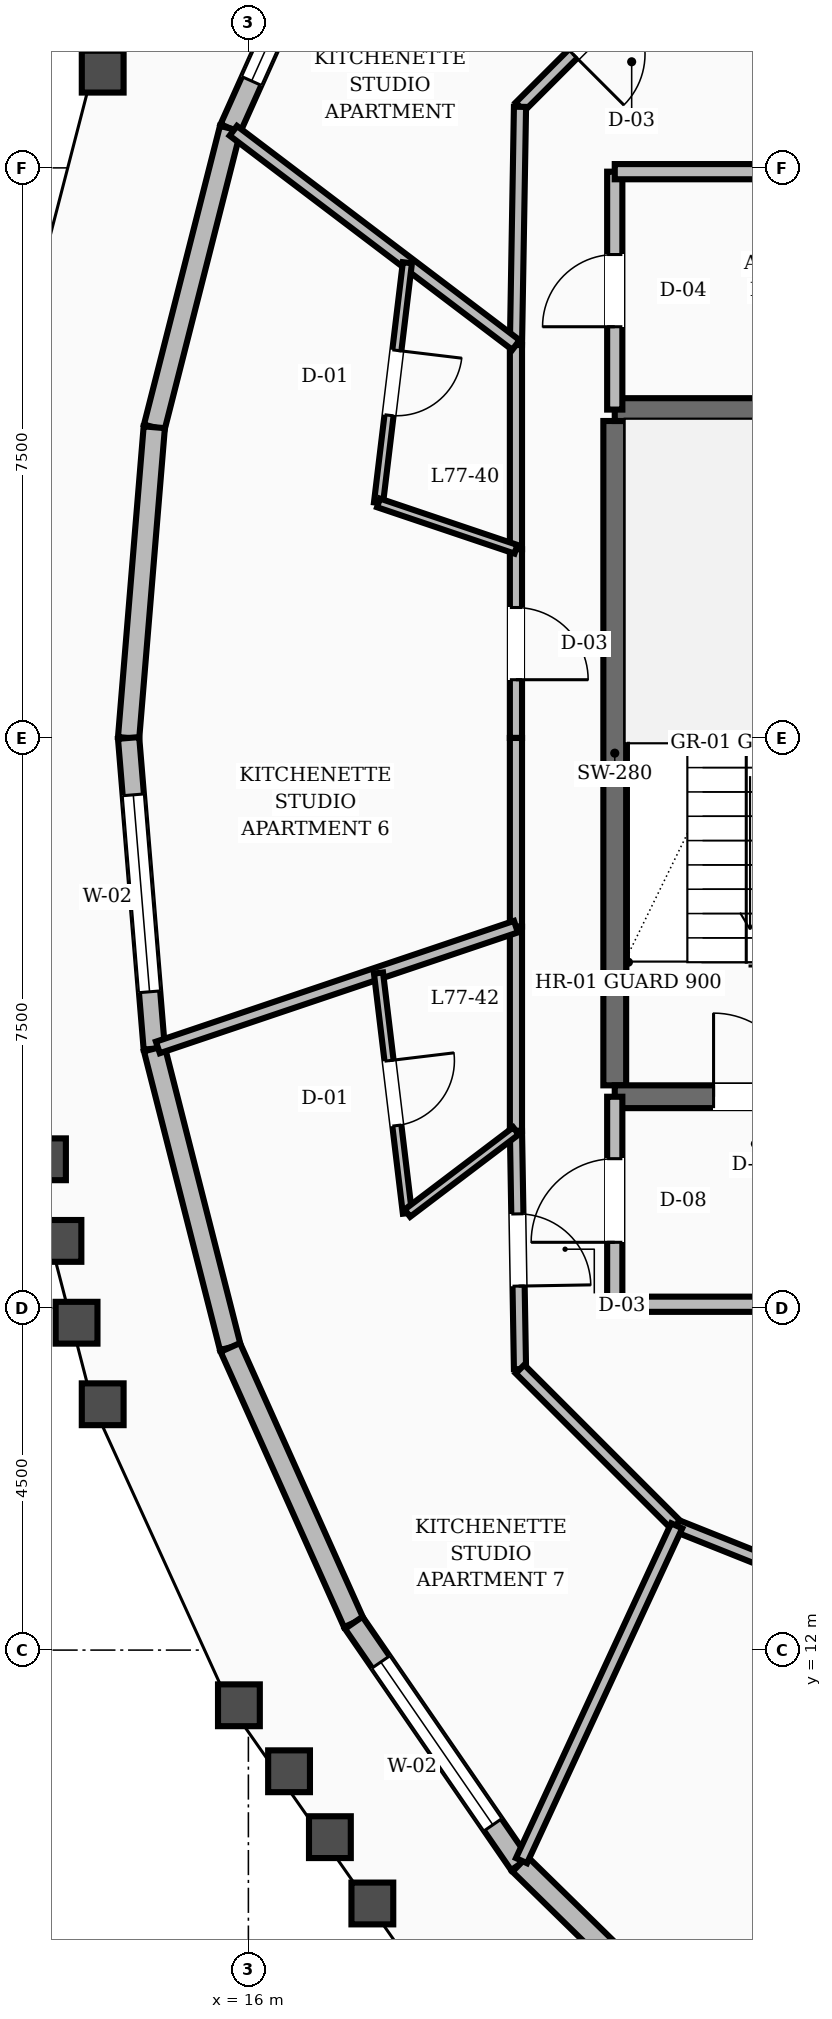
"""IFC4 building model, lengths in metres.
Left out: names, types, materials, properties, quantities, classifications, styles, units other than length and angle.
Written with IfcOpenShell. Run it as: python <this file> out.ifc"""

import sys

from ifc_helpers import new_model, si_unit, direction, frame, frame_2d, origin, place, context, subcontext, project, spatial, rectangle, extrude, element, fill, save


model = new_model("IFC4")
c1 = context("Model", 3, precision=1e-05, world=origin(), true_north=direction((0.0, 1.0)))
c2 = subcontext(c1, "Body", "Model", "MODEL_VIEW")
j1 = project(units=[si_unit("LENGTHUNIT", "METRE"), si_unit("PLANEANGLEUNIT", "RADIAN")], contexts=[c1])
p1 = place(None, origin())
s1 = spatial("IfcSite", under=j1, at=p1, CompositionType="ELEMENT")
p2 = place(p1, origin())
s2 = spatial("IfcBuilding", under=s1, at=p2, CompositionType="ELEMENT")
p3 = place(p2, frame((0.0, 0.0, 294.0)))
s3 = spatial("IfcBuildingStorey", under=s2, at=p3, CompositionType="ELEMENT", Elevation=294.0)
p4 = place(p3, frame((20.82, 19.43, 0.0), z_axis=(0.0, 0.0, 1.0), x_axis=(0.0, 1.0, 0.0)))
e1 = element("IfcWall", 1, at=p4, inside=s3, PredefinedType="SHEAR", context=c2, shape_type="SweptSolid", body=[
    extrude(rectangle(XDim=8.74, YDim=0.3, at=frame_2d((4.37, 0.0))), origin(), (0.0, 0.0, 1.0), 3.6),
])
p5 = place(p3, frame((20.82, 19.28, 0.0), z_axis=(0.0, 0.0, 1.0), x_axis=(1.0, 0.0, 0.0)))
e2 = element("IfcWall", 2, at=p5, inside=s3, PredefinedType="SHEAR", context=c2, shape_type="SweptSolid", body=[
    extrude(rectangle(XDim=3.6, YDim=0.3, at=frame_2d((1.8, 0.0))), origin(), (0.0, 0.0, 1.0), 3.6),
])
p6 = place(p5, frame((1.3, 0.0, 0.0)))
e3 = element("IfcOpeningElement", 3, at=p6, cuts=e2, PredefinedType="OPENING", context=c2, shape_type="SweptSolid", body=[
    extrude(rectangle(XDim=1.1, YDim=2.1, at=frame_2d((0.55, 1.05))), frame((0.0, 0.16, 0.0), z_axis=(0.0, -1.0, 0.0), x_axis=(1.0, 0.0, 0.0)), (0.0, 0.0, 1.0), 0.32),
])
p7 = place(p3, frame((20.82, 28.32, 0.0), z_axis=(0.0, 0.0, 1.0), x_axis=(1.0, 0.0, 0.0)))
e4 = element("IfcWall", 4, at=p7, inside=s3, PredefinedType="SHEAR", context=c2, shape_type="SweptSolid", body=[
    extrude(rectangle(XDim=3.6, YDim=0.3, at=frame_2d((1.8, 0.0))), origin(), (0.0, 0.0, 1.0), 3.6),
])
p8 = place(p3, frame((17.386, 35.64, 0.0), z_axis=(0.0, 0.0, 1.0), x_axis=(-0.409103581908, -0.912487950205, 0.0)))
e5 = element("IfcWall", 5, at=p8, inside=s3, PredefinedType="STANDARD", context=c2, shape_type="SweptSolid", body=[
    extrude(rectangle(XDim=3.97, YDim=0.28, at=frame_2d((1.985, 0.0))), origin(), (0.0, 0.0, 1.0), 2.82),
])
p9 = place(p8, frame((0.685, 0.0, 0.8)))
e6 = element("IfcOpeningElement", 6, at=p9, cuts=e5, PredefinedType="OPENING", context=c2, shape_type="SweptSolid", body=[
    extrude(rectangle(XDim=2.6, YDim=1.65, at=frame_2d((1.3, 0.825))), frame((0.0, 0.15, 0.0), z_axis=(0.0, -1.0, 0.0), x_axis=(1.0, 0.0, 0.0)), (0.0, 0.0, 1.0), 0.3),
])
p10 = place(p3, frame((15.762, 32.018, 0.0), z_axis=(0.0, 0.0, 1.0), x_axis=(-0.246626857917, -0.969110516378, 0.0)))
e7 = element("IfcWall", 7, at=p10, inside=s3, PredefinedType="STANDARD", context=c2, shape_type="SweptSolid", body=[
    extrude(rectangle(XDim=4.056, YDim=0.28, at=frame_2d((2.028, 0.0))), origin(), (0.0, 0.0, 1.0), 2.82),
])
p11 = place(p3, frame((14.762, 28.088, 0.0), z_axis=(0.0, 0.0, 1.0), x_axis=(-0.082321320945, -0.996605839898, 0.0)))
e8 = element("IfcWall", 8, at=p11, inside=s3, PredefinedType="STANDARD", context=c2, shape_type="SweptSolid", body=[
    extrude(rectangle(XDim=4.102, YDim=0.28, at=frame_2d((2.051, 0.0))), origin(), (0.0, 0.0, 1.0), 2.82),
])
p12 = place(p3, frame((14.424, 24.0, 0.0), z_axis=(0.0, 0.0, 1.0), x_axis=(0.082321320945, -0.996605839898, 0.0)))
e9 = element("IfcWall", 9, at=p12, inside=s3, PredefinedType="STANDARD", context=c2, shape_type="SweptSolid", body=[
    extrude(rectangle(XDim=4.102, YDim=0.28, at=frame_2d((2.051, 0.0))), origin(), (0.0, 0.0, 1.0), 2.82),
])
p13 = place(p12, frame((0.751, 0.0, 0.8)))
e10 = element("IfcOpeningElement", 10, at=p13, cuts=e9, PredefinedType="OPENING", context=c2, shape_type="SweptSolid", body=[
    extrude(rectangle(XDim=2.6, YDim=1.65, at=frame_2d((1.3, 0.825))), frame((0.0, 0.15, 0.0), z_axis=(0.0, -1.0, 0.0), x_axis=(1.0, 0.0, 0.0)), (0.0, 0.0, 1.0), 0.3),
])
p14 = place(p3, frame((14.762, 19.912, 0.0), z_axis=(0.0, 0.0, 1.0), x_axis=(0.246626857917, -0.969110516378, 0.0)))
e11 = element("IfcWall", 11, at=p14, inside=s3, PredefinedType="STANDARD", context=c2, shape_type="SweptSolid", body=[
    extrude(rectangle(XDim=4.056, YDim=0.28, at=frame_2d((2.028, 0.0))), origin(), (0.0, 0.0, 1.0), 2.82),
])
p15 = place(p3, frame((15.762, 15.982, 0.0), z_axis=(0.0, 0.0, 1.0), x_axis=(0.409103581908, -0.912487950205, 0.0)))
e12 = element("IfcWall", 12, at=p15, inside=s3, PredefinedType="STANDARD", context=c2, shape_type="SweptSolid", body=[
    extrude(rectangle(XDim=3.97, YDim=0.28, at=frame_2d((1.985, 0.0))), origin(), (0.0, 0.0, 1.0), 2.82),
])
p16 = place(p3, frame((17.386, 12.36, 0.0), z_axis=(0.0, 0.0, 1.0), x_axis=(0.567090463347, -0.823655514388, 0.0)))
e13 = element("IfcWall", 13, at=p16, inside=s3, PredefinedType="STANDARD", context=c2, shape_type="SweptSolid", body=[
    extrude(rectangle(XDim=3.855, YDim=0.28, at=frame_2d((1.927, 0.0))), origin(), (0.0, 0.0, 1.0), 2.82),
])
p17 = place(p16, frame((0.627, 0.0, 0.8)))
e14 = element("IfcOpeningElement", 14, at=p17, cuts=e13, PredefinedType="OPENING", context=c2, shape_type="SweptSolid", body=[
    extrude(rectangle(XDim=2.6, YDim=1.65, at=frame_2d((1.3, 0.825))), frame((0.0, 0.15, 0.0), z_axis=(0.0, -1.0, 0.0), x_axis=(1.0, 0.0, 0.0)), (0.0, 0.0, 1.0), 0.3),
])
p18 = place(p3, frame((19.572, 9.185, 0.0), z_axis=(0.0, 0.0, 1.0), x_axis=(0.714829041056, -0.699299250724, 0.0)))
e15 = element("IfcWall", 15, at=p18, inside=s3, PredefinedType="STANDARD", context=c2, shape_type="SweptSolid", body=[
    extrude(rectangle(XDim=3.726, YDim=0.28, at=frame_2d((1.863, 0.0))), origin(), (0.0, 0.0, 1.0), 2.82),
])
p19 = place(p3, frame((20.82, 16.55, 0.0), z_axis=(0.0, 0.0, 1.0), x_axis=(0.0, 1.0, 0.0)))
e16 = element("IfcWall", 16, at=p19, inside=s3, PredefinedType="SOLIDWALL", context=c2, shape_type="SweptSolid", body=[
    extrude(rectangle(XDim=2.73, YDim=0.2, at=frame_2d((1.365, 0.0))), origin(), (0.0, 0.0, 1.0), 2.81),
])
p20 = place(p19, frame((0.815, 0.0, 0.0)))
e17 = element("IfcOpeningElement", 17, at=p20, cuts=e16, PredefinedType="OPENING", context=c2, shape_type="SweptSolid", body=[
    extrude(rectangle(XDim=1.1, YDim=2.1, at=frame_2d((0.55, 1.05))), frame((0.0, 0.11, 0.0), z_axis=(0.0, -1.0, 0.0), x_axis=(1.0, 0.0, 0.0)), (0.0, 0.0, 1.0), 0.22),
])
p21 = place(p3, frame((20.82, 16.55, 0.0), z_axis=(0.0, 0.0, 1.0), x_axis=(1.0, 0.0, 0.0)))
e18 = element("IfcWall", 18, at=p21, inside=s3, PredefinedType="SOLIDWALL", context=c2, shape_type="SweptSolid", body=[
    extrude(rectangle(XDim=3.98, YDim=0.2, at=frame_2d((1.99, 0.0))), origin(), (0.0, 0.0, 1.0), 2.81),
])
p22 = place(p3, frame((20.82, 28.32, 0.0), z_axis=(0.0, 0.0, 1.0), x_axis=(0.0, 1.0, 0.0)))
e19 = element("IfcWall", 19, at=p22, inside=s3, PredefinedType="SOLIDWALL", context=c2, shape_type="SweptSolid", body=[
    extrude(rectangle(XDim=3.13, YDim=0.2, at=frame_2d((1.565, 0.0))), origin(), (0.0, 0.0, 1.0), 2.81),
])
p23 = place(p22, frame((1.09, 0.0, 0.0)))
e20 = element("IfcOpeningElement", 20, at=p23, cuts=e19, PredefinedType="OPENING", context=c2, shape_type="SweptSolid", body=[
    extrude(rectangle(XDim=0.95, YDim=2.1, at=frame_2d((0.475, 1.05))), frame((0.0, 0.11, 0.0), z_axis=(0.0, -1.0, 0.0), x_axis=(1.0, 0.0, 0.0)), (0.0, 0.0, 1.0), 0.22),
])
p24 = place(p3, frame((20.82, 31.45, 0.0), z_axis=(0.0, 0.0, 1.0), x_axis=(1.0, 0.0, 0.0)))
e21 = element("IfcWall", 21, at=p24, inside=s3, PredefinedType="SOLIDWALL", context=c2, shape_type="SweptSolid", body=[
    extrude(rectangle(XDim=3.98, YDim=0.2, at=frame_2d((1.99, 0.0))), origin(), (0.0, 0.0, 1.0), 2.81),
])
p25 = place(p3, frame((21.635, 34.365, 0.0), z_axis=(0.0, 0.0, 1.0), x_axis=(-0.707106781187, -0.707106781187, 0.0)))
e22 = element("IfcWall", 22, at=p25, inside=s3, PredefinedType="SOLIDWALL", context=c2, shape_type="SweptSolid", body=[
    extrude(rectangle(XDim=2.916, YDim=0.16, at=frame_2d((1.458, 0.0))), origin(), (0.0, 0.0, 1.0), 2.81),
])
p26 = place(p25, frame((0.983, 0.0, 0.0)))
e23 = element("IfcOpeningElement", 23, at=p26, cuts=e22, PredefinedType="OPENING", context=c2, shape_type="SweptSolid", body=[
    extrude(rectangle(XDim=0.95, YDim=2.1, at=frame_2d((0.475, 1.05))), frame((0.0, 0.09, 0.0), z_axis=(0.0, -1.0, 0.0), x_axis=(1.0, 0.0, 0.0)), (0.0, 0.0, 1.0), 0.18),
])
p27 = place(p3, frame((19.573, 32.303, 0.0), z_axis=(0.0, 0.0, 1.0), x_axis=(-0.016981035134, -0.999855811828, 0.0)))
e24 = element("IfcWall", 24, at=p27, inside=s3, PredefinedType="SOLIDWALL", context=c2, shape_type="SweptSolid", body=[
    extrude(rectangle(XDim=3.134, YDim=0.16, at=frame_2d((1.567, 0.0))), origin(), (0.0, 0.0, 1.0), 2.81),
])
p28 = place(p3, frame((19.52, 29.169, 0.0), z_axis=(0.0, 0.0, 1.0), x_axis=(0.0, -1.0, 0.0)))
e25 = element("IfcWall", 25, at=p28, inside=s3, PredefinedType="SOLIDWALL", context=c2, shape_type="SweptSolid", body=[
    extrude(rectangle(XDim=2.687, YDim=0.16, at=frame_2d((1.344, 0.0))), origin(), (0.0, 0.0, 1.0), 2.81),
])
p29 = place(p3, frame((19.52, 26.482, 0.0), z_axis=(0.0, 0.0, 1.0), x_axis=(0.0, -1.0, 0.0)))
e26 = element("IfcWall", 26, at=p29, inside=s3, PredefinedType="SOLIDWALL", context=c2, shape_type="SweptSolid", body=[
    extrude(rectangle(XDim=2.482, YDim=0.16, at=frame_2d((1.241, 0.0))), origin(), (0.0, 0.0, 1.0), 2.81),
])
p30 = place(p29, frame((0.766, 0.0, 0.0)))
e27 = element("IfcOpeningElement", 27, at=p30, cuts=e26, PredefinedType="OPENING", context=c2, shape_type="SweptSolid", body=[
    extrude(rectangle(XDim=0.95, YDim=2.1, at=frame_2d((0.475, 1.05))), frame((0.0, 0.09, 0.0), z_axis=(0.0, -1.0, 0.0), x_axis=(1.0, 0.0, 0.0)), (0.0, 0.0, 1.0), 0.18),
])
p31 = place(p3, frame((19.52, 24.0, 0.0), z_axis=(0.0, 0.0, 1.0), x_axis=(0.0, -1.0, 0.0)))
e28 = element("IfcWall", 28, at=p31, inside=s3, PredefinedType="SOLIDWALL", context=c2, shape_type="SweptSolid", body=[
    extrude(rectangle(XDim=2.482, YDim=0.16, at=frame_2d((1.241, 0.0))), origin(), (0.0, 0.0, 1.0), 2.81),
])
p32 = place(p3, frame((19.52, 21.518, 0.0), z_axis=(0.0, 0.0, 1.0), x_axis=(0.0, -1.0, 0.0)))
e29 = element("IfcWall", 29, at=p32, inside=s3, PredefinedType="SOLIDWALL", context=c2, shape_type="SweptSolid", body=[
    extrude(rectangle(XDim=2.687, YDim=0.16, at=frame_2d((1.344, 0.0))), origin(), (0.0, 0.0, 1.0), 2.81),
])
p33 = place(p3, frame((19.52, 18.831, 0.0), z_axis=(0.0, 0.0, 1.0), x_axis=(0.016981035134, -0.999855811828, 0.0)))
e30 = element("IfcWall", 30, at=p33, inside=s3, PredefinedType="SOLIDWALL", context=c2, shape_type="SweptSolid", body=[
    extrude(rectangle(XDim=3.134, YDim=0.16, at=frame_2d((1.567, 0.0))), origin(), (0.0, 0.0, 1.0), 2.81),
])
p34 = place(p33, frame((1.092, 0.0, 0.0)))
e31 = element("IfcOpeningElement", 31, at=p34, cuts=e30, PredefinedType="OPENING", context=c2, shape_type="SweptSolid", body=[
    extrude(rectangle(XDim=0.95, YDim=2.1, at=frame_2d((0.475, 1.05))), frame((0.0, 0.09, 0.0), z_axis=(0.0, -1.0, 0.0), x_axis=(1.0, 0.0, 0.0)), (0.0, 0.0, 1.0), 0.18),
])
p35 = place(p3, frame((19.573, 15.697, 0.0), z_axis=(0.0, 0.0, 1.0), x_axis=(0.707106781187, -0.707106781187, 0.0)))
e32 = element("IfcWall", 32, at=p35, inside=s3, PredefinedType="SOLIDWALL", context=c2, shape_type="SweptSolid", body=[
    extrude(rectangle(XDim=2.916, YDim=0.16, at=frame_2d((1.458, 0.0))), origin(), (0.0, 0.0, 1.0), 2.81),
])
p36 = place(p3, frame((21.635, 13.635, 0.0), z_axis=(0.0, 0.0, 1.0), x_axis=(0.92856882165, -0.371160266542, 0.0)))
e33 = element("IfcWall", 33, at=p36, inside=s3, PredefinedType="SOLIDWALL", context=c2, shape_type="SweptSolid", body=[
    extrude(rectangle(XDim=2.923, YDim=0.16, at=frame_2d((1.461, 0.0))), origin(), (0.0, 0.0, 1.0), 2.81),
])
p37 = place(p3, frame((19.52, 29.169, 0.0), z_axis=(0.0, 0.0, 1.0), x_axis=(-0.796937950296, 0.604061175195, 0.0)))
e34 = element("IfcWall", 34, at=p37, inside=s3, PredefinedType="SOLIDWALL", context=c2, shape_type="SweptSolid", body=[
    extrude(rectangle(XDim=4.666, YDim=0.16, at=frame_2d((2.333, 0.0))), origin(), (0.0, 0.0, 1.0), 2.81),
])
p38 = place(p3, frame((18.092, 30.252, 0.0), z_axis=(0.0, 0.0, 1.0), x_axis=(-0.119369071505, -0.992849950782, 0.0)))
e35 = element("IfcWall", 35, at=p38, inside=s3, PredefinedType="PARTITIONING", context=c2, shape_type="SweptSolid", body=[
    extrude(rectangle(XDim=3.182, YDim=0.12, at=frame_2d((1.591, 0.0))), origin(), (0.0, 0.0, 1.0), 2.81),
])
p39 = place(p38, frame((1.161, 0.0, 0.0)))
e36 = element("IfcOpeningElement", 36, at=p39, cuts=e35, PredefinedType="OPENING", context=c2, shape_type="SweptSolid", body=[
    extrude(rectangle(XDim=0.86, YDim=2.1, at=frame_2d((0.43, 1.05))), frame((0.0, 0.07, 0.0), z_axis=(0.0, -1.0, 0.0), x_axis=(1.0, 0.0, 0.0)), (0.0, 0.0, 1.0), 0.14),
])
p40 = place(p3, frame((19.52, 26.482, 0.0), z_axis=(0.0, 0.0, 1.0), x_axis=(-0.947551380021, 0.319603476545, 0.0)))
e37 = element("IfcWall", 37, at=p40, inside=s3, PredefinedType="PARTITIONING", context=c2, shape_type="SweptSolid", body=[
    extrude(rectangle(XDim=1.908, YDim=0.12, at=frame_2d((0.954, 0.0))), origin(), (0.0, 0.0, 1.0), 2.81),
])
p41 = place(p3, frame((19.52, 21.518, 0.0), z_axis=(0.0, 0.0, 1.0), x_axis=(-0.947542853747, -0.319628753889, 0.0)))
e38 = element("IfcWall", 38, at=p41, inside=s3, PredefinedType="SOLIDWALL", context=c2, shape_type="SweptSolid", body=[
    extrude(rectangle(XDim=4.972, YDim=0.16, at=frame_2d((2.486, 0.0))), origin(), (0.0, 0.0, 1.0), 2.81),
])
p42 = place(p3, frame((17.712, 20.908, 0.0), z_axis=(0.0, 0.0, 1.0), x_axis=(0.119369071505, -0.992849950782, 0.0)))
e39 = element("IfcWall", 39, at=p42, inside=s3, PredefinedType="PARTITIONING", context=c2, shape_type="SweptSolid", body=[
    extrude(rectangle(XDim=3.182, YDim=0.12, at=frame_2d((1.591, 0.0))), origin(), (0.0, 0.0, 1.0), 2.81),
])
p43 = place(p42, frame((1.161, 0.0, 0.0)))
e40 = element("IfcOpeningElement", 40, at=p43, cuts=e39, PredefinedType="OPENING", context=c2, shape_type="SweptSolid", body=[
    extrude(rectangle(XDim=0.86, YDim=2.1, at=frame_2d((0.43, 1.05))), frame((0.0, 0.07, 0.0), z_axis=(0.0, -1.0, 0.0), x_axis=(1.0, 0.0, 0.0)), (0.0, 0.0, 1.0), 0.14),
])
p44 = place(p3, frame((19.52, 18.831, 0.0), z_axis=(0.0, 0.0, 1.0), x_axis=(-0.7969490598, -0.604046518146, 0.0)))
e41 = element("IfcWall", 41, at=p44, inside=s3, PredefinedType="PARTITIONING", context=c2, shape_type="SweptSolid", body=[
    extrude(rectangle(XDim=1.792, YDim=0.12, at=frame_2d((0.896, 0.0))), origin(), (0.0, 0.0, 1.0), 2.81),
])
p45 = place(p3, frame((21.635, 13.635, 0.0), z_axis=(0.0, 0.0, 1.0), x_axis=(-0.420569037513, -0.907260538481, 0.0)))
e42 = element("IfcWall", 42, at=p45, inside=s3, PredefinedType="SOLIDWALL", context=c2, shape_type="SweptSolid", body=[
    extrude(rectangle(XDim=4.855, YDim=0.16, at=frame_2d((2.428, 0.0))), origin(), (0.0, 0.0, 1.0), 2.81),
])
p46 = place(p9, origin())
e43 = element("IfcWindow", 43, at=p46, inside=s3, PartitioningType="SINGLE_PANEL", PredefinedType="WINDOW", context=c2, shape_type="SweptSolid", body=[
    extrude(rectangle(XDim=2.6, YDim=1.65, at=frame_2d((1.3, 0.825))), frame((0.0, 0.03, 0.0), z_axis=(0.0, -1.0, 0.0), x_axis=(1.0, 0.0, 0.0)), (0.0, 0.0, 1.0), 0.06),
])
fill(e6, e43)
p47 = place(p13, origin())
e44 = element("IfcWindow", 44, at=p47, inside=s3, PartitioningType="SINGLE_PANEL", PredefinedType="WINDOW", context=c2, shape_type="SweptSolid", body=[
    extrude(rectangle(XDim=2.6, YDim=1.65, at=frame_2d((1.3, 0.825))), frame((0.0, 0.03, 0.0), z_axis=(0.0, -1.0, 0.0), x_axis=(1.0, 0.0, 0.0)), (0.0, 0.0, 1.0), 0.06),
])
fill(e10, e44)
p48 = place(p17, origin())
e45 = element("IfcWindow", 45, at=p48, inside=s3, PartitioningType="SINGLE_PANEL", PredefinedType="WINDOW", context=c2, shape_type="SweptSolid", body=[
    extrude(rectangle(XDim=2.6, YDim=1.65, at=frame_2d((1.3, 0.825))), frame((0.0, 0.03, 0.0), z_axis=(0.0, -1.0, 0.0), x_axis=(1.0, 0.0, 0.0)), (0.0, 0.0, 1.0), 0.06),
])
fill(e14, e45)
p49 = place(p6, origin())
e46 = element("IfcDoor", 46, at=p49, inside=s3, OperationType="SINGLE_SWING_LEFT", PredefinedType="DOOR", context=c2, shape_type="SweptSolid", body=[
    extrude(rectangle(XDim=1.1, YDim=2.1, at=frame_2d((0.55, 1.05))), frame((0.0, 0.025, 0.0), z_axis=(0.0, -1.0, 0.0), x_axis=(1.0, 0.0, 0.0)), (0.0, 0.0, 1.0), 0.05),
])
fill(e3, e46)
p50 = place(p20, origin())
e47 = element("IfcDoor", 47, at=p50, inside=s3, OperationType="SINGLE_SWING_LEFT", PredefinedType="DOOR", context=c2, shape_type="SweptSolid", body=[
    extrude(rectangle(XDim=1.1, YDim=2.1, at=frame_2d((0.55, 1.05))), frame((0.0, 0.025, 0.0), z_axis=(0.0, -1.0, 0.0), x_axis=(1.0, 0.0, 0.0)), (0.0, 0.0, 1.0), 0.05),
])
fill(e17, e47)
p51 = place(p23, origin())
e48 = element("IfcDoor", 48, at=p51, inside=s3, OperationType="SINGLE_SWING_LEFT", PredefinedType="DOOR", context=c2, shape_type="SweptSolid", body=[
    extrude(rectangle(XDim=0.95, YDim=2.1, at=frame_2d((0.475, 1.05))), frame((0.0, 0.025, 0.0), z_axis=(0.0, -1.0, 0.0), x_axis=(1.0, 0.0, 0.0)), (0.0, 0.0, 1.0), 0.05),
])
fill(e20, e48)
p52 = place(p26, origin())
e49 = element("IfcDoor", 49, at=p52, inside=s3, OperationType="SINGLE_SWING_RIGHT", PredefinedType="DOOR", context=c2, shape_type="SweptSolid", body=[
    extrude(rectangle(XDim=0.95, YDim=2.1, at=frame_2d((0.475, 1.05))), frame((0.0, 0.025, 0.0), z_axis=(0.0, -1.0, 0.0), x_axis=(1.0, 0.0, 0.0)), (0.0, 0.0, 1.0), 0.05),
])
fill(e23, e49)
p53 = place(p39, origin())
e50 = element("IfcDoor", 50, at=p53, inside=s3, OperationType="SINGLE_SWING_LEFT", PredefinedType="DOOR", context=c2, shape_type="SweptSolid", body=[
    extrude(rectangle(XDim=0.86, YDim=2.1, at=frame_2d((0.43, 1.05))), frame((0.0, 0.025, 0.0), z_axis=(0.0, -1.0, 0.0), x_axis=(1.0, 0.0, 0.0)), (0.0, 0.0, 1.0), 0.05),
])
fill(e36, e50)
p54 = place(p30, origin())
e51 = element("IfcDoor", 51, at=p54, inside=s3, OperationType="SINGLE_SWING_RIGHT", PredefinedType="DOOR", context=c2, shape_type="SweptSolid", body=[
    extrude(rectangle(XDim=0.95, YDim=2.1, at=frame_2d((0.475, 1.05))), frame((0.0, 0.025, 0.0), z_axis=(0.0, -1.0, 0.0), x_axis=(1.0, 0.0, 0.0)), (0.0, 0.0, 1.0), 0.05),
])
fill(e27, e51)
p55 = place(p43, origin())
e52 = element("IfcDoor", 52, at=p55, inside=s3, OperationType="SINGLE_SWING_LEFT", PredefinedType="DOOR", context=c2, shape_type="SweptSolid", body=[
    extrude(rectangle(XDim=0.86, YDim=2.1, at=frame_2d((0.43, 1.05))), frame((0.0, 0.025, 0.0), z_axis=(0.0, -1.0, 0.0), x_axis=(1.0, 0.0, 0.0)), (0.0, 0.0, 1.0), 0.05),
])
fill(e40, e52)
p56 = place(p34, origin())
e53 = element("IfcDoor", 53, at=p56, inside=s3, OperationType="SINGLE_SWING_RIGHT", PredefinedType="DOOR", context=c2, shape_type="SweptSolid", body=[
    extrude(rectangle(XDim=0.95, YDim=2.1, at=frame_2d((0.475, 1.05))), frame((0.0, 0.025, 0.0), z_axis=(0.0, -1.0, 0.0), x_axis=(1.0, 0.0, 0.0)), (0.0, 0.0, 1.0), 0.05),
])
fill(e31, e53)
save(model, sys.argv[1])
